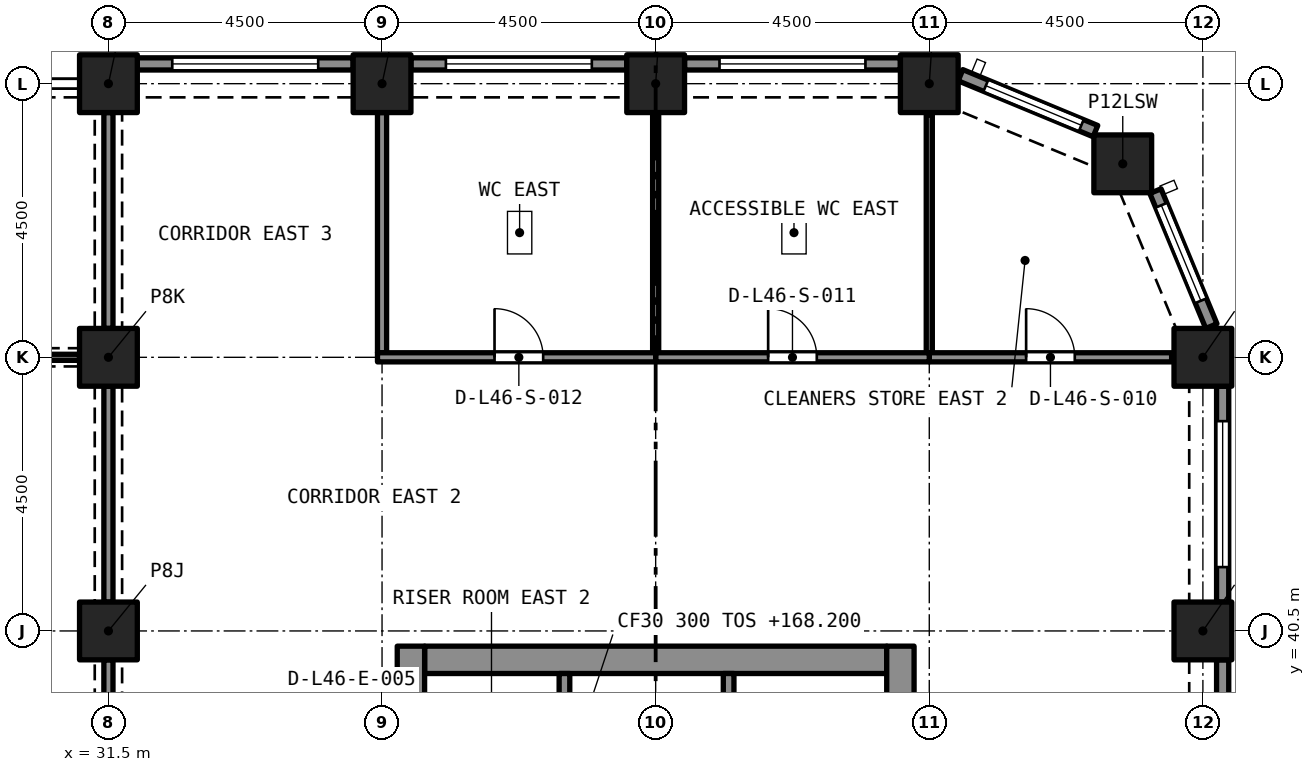
"""IFC4 building model, lengths in metres.
Left out: names, types, materials, properties, quantities, classifications, styles, units other than length and angle.
Written with IfcOpenShell. Run it as: python <this file> out.ifc"""

import sys

from ifc_helpers import new_model, si_unit, direction, frame, frame_2d, origin, origin_2d, place, context, subcontext, project, spatial, rectangle, extrude, element, fill, save


model = new_model("IFC4")
c1 = context("Model", 3, precision=1e-05, world=origin(), true_north=direction((0.0, 1.0)))
c2 = subcontext(c1, "Body", "Model", "MODEL_VIEW")
j1 = project(units=[si_unit("LENGTHUNIT", "METRE"), si_unit("PLANEANGLEUNIT", "RADIAN")], contexts=[c1])
p1 = place(None, origin())
s1 = spatial("IfcSite", under=j1, at=p1, CompositionType="ELEMENT")
p2 = place(p1, origin())
s2 = spatial("IfcBuilding", under=s1, at=p2, CompositionType="ELEMENT")
p3 = place(p2, frame((0.0, 0.0, 168.2)))
s3 = spatial("IfcBuildingStorey", under=s2, at=p3, CompositionType="ELEMENT", Elevation=168.2)
for number, where, z_axis, x_axis in (
    (1, (31.5, 40.5, 0.0), (0.0, 0.0, 1.0), (1.0, 0.0, 0.0)),
    (2, (49.5, 40.5, 0.0), (0.0, 0.0, 1.0), (1.0, 0.0, 0.0)),
    (3, (31.5, 45.0, 0.0), (0.0, 0.0, 1.0), (1.0, 0.0, 0.0)),
    (4, (49.5, 45.0, 0.0), (0.0, 0.0, 1.0), (1.0, 0.0, 0.0)),
    (5, (48.182, 48.182, 0.0), (0.0, 0.0, 1.0), (1.0, 0.0, 0.0)),
    (6, (31.5, 49.5, 0.0), (0.0, 0.0, 1.0), (1.0, 0.0, 0.0)),
    (7, (36.0, 49.5, 0.0), (0.0, 0.0, 1.0), (1.0, 0.0, 0.0)),
    (8, (40.5, 49.5, 0.0), (0.0, 0.0, 1.0), (1.0, 0.0, 0.0)),
    (9, (45.0, 49.5, 0.0), (0.0, 0.0, 1.0), (1.0, 0.0, 0.0)),
):
    element("IfcColumn", number, at=place(p3, frame(where, z_axis=z_axis, x_axis=x_axis)), inside=s3, PredefinedType="COLUMN", context=c2, shape_type="SweptSolid", body=[
        extrude(rectangle(XDim=0.95, YDim=0.95, at=origin_2d()), origin(), (0.0, 0.0, 1.0), 4.4),
    ])
p4 = place(p3, frame((36.7, 40.025, 0.0), z_axis=(0.0, 0.0, 1.0), x_axis=(1.0, 0.0, 0.0)))
e10 = element("IfcWall", 10, at=p4, inside=s3, PredefinedType="SOLIDWALL", context=c2, shape_type="SweptSolid", body=[
    extrude(rectangle(XDim=7.6, YDim=0.45, at=frame_2d((3.8, 0.0))), origin(), (0.0, 0.0, 1.0), 4.4),
])
p5 = place(p3, frame((36.475, 27.25, 0.0), z_axis=(0.0, 0.0, 1.0), x_axis=(0.0, 1.0, 0.0)))
e11 = element("IfcWall", 11, at=p5, inside=s3, PredefinedType="SOLIDWALL", context=c2, shape_type="SweptSolid", body=[
    extrude(rectangle(XDim=13.0, YDim=0.45, at=frame_2d((6.5, 0.0))), origin(), (0.0, 0.0, 1.0), 4.4),
])
p6 = place(p5, frame((8.7, 0.0, 0.0)))
e12 = element("IfcOpeningElement", 12, at=p6, cuts=e11, PredefinedType="OPENING", context=c2, shape_type="SweptSolid", body=[
    extrude(rectangle(XDim=1.2, YDim=2.1, at=frame_2d((0.6, 1.05))), frame((0.0, 0.235, 0.0), z_axis=(0.0, -1.0, 0.0), x_axis=(1.0, 0.0, 0.0)), (0.0, 0.0, 1.0), 0.47),
])
p7 = place(p3, frame((44.525, 27.25, 0.0), z_axis=(0.0, 0.0, 1.0), x_axis=(0.0, 1.0, 0.0)))
e13 = element("IfcWall", 13, at=p7, inside=s3, PredefinedType="SOLIDWALL", context=c2, shape_type="SweptSolid", body=[
    extrude(rectangle(XDim=13.0, YDim=0.45, at=frame_2d((6.5, 0.0))), origin(), (0.0, 0.0, 1.0), 4.4),
])
p8 = place(p7, frame((8.7, 0.0, 0.0)))
e14 = element("IfcOpeningElement", 14, at=p8, cuts=e13, PredefinedType="OPENING", context=c2, shape_type="SweptSolid", body=[
    extrude(rectangle(XDim=1.2, YDim=2.1, at=frame_2d((0.6, 1.05))), frame((0.0, 0.235, 0.0), z_axis=(0.0, -1.0, 0.0), x_axis=(1.0, 0.0, 0.0)), (0.0, 0.0, 1.0), 0.47),
])
p9 = place(p3, frame((49.825, 40.025, 0.0), z_axis=(0.0, 0.0, 1.0), x_axis=(0.0, -1.0, 0.0)))
e15 = element("IfcWall", 15, at=p9, inside=s3, PredefinedType="SOLIDWALL", context=c2, shape_type="SweptSolid", body=[
    extrude(rectangle(XDim=3.55, YDim=0.2, at=frame_2d((1.775, 0.0))), origin(), (0.0, 0.0, 1.0), 4.4),
])
p10 = place(p9, frame((0.575, 0.0, 0.45)))
e16 = element("IfcOpeningElement", 16, at=p10, cuts=e15, PredefinedType="OPENING", context=c2, shape_type="SweptSolid", body=[
    extrude(rectangle(XDim=2.4, YDim=2.55, at=frame_2d((1.2, 1.275))), frame((0.0, 0.11, 0.0), z_axis=(0.0, -1.0, 0.0), x_axis=(1.0, 0.0, 0.0)), (0.0, 0.0, 1.0), 0.22),
])
p11 = place(p3, frame((49.825, 44.525, 0.0), z_axis=(0.0, 0.0, 1.0), x_axis=(0.0, -1.0, 0.0)))
e17 = element("IfcWall", 17, at=p11, inside=s3, PredefinedType="SOLIDWALL", context=c2, shape_type="SweptSolid", body=[
    extrude(rectangle(XDim=3.55, YDim=0.2, at=frame_2d((1.775, 0.0))), origin(), (0.0, 0.0, 1.0), 4.4),
])
p12 = place(p11, frame((0.575, 0.0, 0.45)))
e18 = element("IfcOpeningElement", 18, at=p12, cuts=e17, PredefinedType="OPENING", context=c2, shape_type="SweptSolid", body=[
    extrude(rectangle(XDim=2.4, YDim=2.55, at=frame_2d((1.2, 1.275))), frame((0.0, 0.11, 0.0), z_axis=(0.0, -1.0, 0.0), x_axis=(1.0, 0.0, 0.0)), (0.0, 0.0, 1.0), 0.22),
])
p13 = place(p3, frame((48.72, 47.733, 0.0), z_axis=(0.0, 0.0, 1.0), x_axis=(0.382680855588, -0.923880599843, 0.0)))
e19 = element("IfcWall", 19, at=p13, inside=s3, PredefinedType="SOLIDWALL", context=c2, shape_type="SweptSolid", body=[
    extrude(rectangle(XDim=2.403, YDim=0.2, at=frame_2d((1.201, 0.0))), origin(), (0.0, 0.0, 1.0), 4.4),
])
p14 = place(p13, frame((0.251, 0.0, 0.45)))
e20 = element("IfcOpeningElement", 20, at=p14, cuts=e19, PredefinedType="OPENING", context=c2, shape_type="SweptSolid", body=[
    extrude(rectangle(XDim=1.7, YDim=2.55, at=frame_2d((0.85, 1.275))), frame((0.0, 0.11, 0.0), z_axis=(0.0, -1.0, 0.0), x_axis=(1.0, 0.0, 0.0)), (0.0, 0.0, 1.0), 0.22),
])
p15 = place(p3, frame((45.513, 49.639, 0.0), z_axis=(0.0, 0.0, 1.0), x_axis=(0.923880599843, -0.382680855588, 0.0)))
e21 = element("IfcWall", 21, at=p15, inside=s3, PredefinedType="SOLIDWALL", context=c2, shape_type="SweptSolid", body=[
    extrude(rectangle(XDim=2.403, YDim=0.2, at=frame_2d((1.201, 0.0))), origin(), (0.0, 0.0, 1.0), 4.4),
])
p16 = place(p15, frame((0.451, 0.0, 0.45)))
e22 = element("IfcOpeningElement", 22, at=p16, cuts=e21, PredefinedType="OPENING", context=c2, shape_type="SweptSolid", body=[
    extrude(rectangle(XDim=1.7, YDim=2.55, at=frame_2d((0.85, 1.275))), frame((0.0, 0.11, 0.0), z_axis=(0.0, -1.0, 0.0), x_axis=(1.0, 0.0, 0.0)), (0.0, 0.0, 1.0), 0.22),
])
p17 = place(p3, frame((40.975, 49.825, 0.0), z_axis=(0.0, 0.0, 1.0), x_axis=(1.0, 0.0, 0.0)))
e23 = element("IfcWall", 23, at=p17, inside=s3, PredefinedType="SOLIDWALL", context=c2, shape_type="SweptSolid", body=[
    extrude(rectangle(XDim=3.55, YDim=0.2, at=frame_2d((1.775, 0.0))), origin(), (0.0, 0.0, 1.0), 4.4),
])
p18 = place(p17, frame((0.575, 0.0, 0.45)))
e24 = element("IfcOpeningElement", 24, at=p18, cuts=e23, PredefinedType="OPENING", context=c2, shape_type="SweptSolid", body=[
    extrude(rectangle(XDim=2.4, YDim=2.55, at=frame_2d((1.2, 1.275))), frame((0.0, 0.11, 0.0), z_axis=(0.0, -1.0, 0.0), x_axis=(1.0, 0.0, 0.0)), (0.0, 0.0, 1.0), 0.22),
])
p19 = place(p3, frame((36.475, 49.825, 0.0), z_axis=(0.0, 0.0, 1.0), x_axis=(1.0, 0.0, 0.0)))
e25 = element("IfcWall", 25, at=p19, inside=s3, PredefinedType="SOLIDWALL", context=c2, shape_type="SweptSolid", body=[
    extrude(rectangle(XDim=3.55, YDim=0.2, at=frame_2d((1.775, 0.0))), origin(), (0.0, 0.0, 1.0), 4.4),
])
p20 = place(p19, frame((0.575, 0.0, 0.45)))
e26 = element("IfcOpeningElement", 26, at=p20, cuts=e25, PredefinedType="OPENING", context=c2, shape_type="SweptSolid", body=[
    extrude(rectangle(XDim=2.4, YDim=2.55, at=frame_2d((1.2, 1.275))), frame((0.0, 0.11, 0.0), z_axis=(0.0, -1.0, 0.0), x_axis=(1.0, 0.0, 0.0)), (0.0, 0.0, 1.0), 0.22),
])
p21 = place(p3, frame((31.975, 49.825, 0.0), z_axis=(0.0, 0.0, 1.0), x_axis=(1.0, 0.0, 0.0)))
e27 = element("IfcWall", 27, at=p21, inside=s3, PredefinedType="SOLIDWALL", context=c2, shape_type="SweptSolid", body=[
    extrude(rectangle(XDim=3.55, YDim=0.2, at=frame_2d((1.775, 0.0))), origin(), (0.0, 0.0, 1.0), 4.4),
])
p22 = place(p21, frame((0.575, 0.0, 0.45)))
e28 = element("IfcOpeningElement", 28, at=p22, cuts=e27, PredefinedType="OPENING", context=c2, shape_type="SweptSolid", body=[
    extrude(rectangle(XDim=2.4, YDim=2.55, at=frame_2d((1.2, 1.275))), frame((0.0, 0.11, 0.0), z_axis=(0.0, -1.0, 0.0), x_axis=(1.0, 0.0, 0.0)), (0.0, 0.0, 1.0), 0.22),
])
for number, where, z_axis, x_axis in (
    (29, (41.7, 37.5, 0.0), (0.0, 0.0, 1.0), (0.0, 1.0, 0.0)),
    (30, (39.0, 37.5, 0.0), (0.0, 0.0, 1.0), (0.0, 1.0, 0.0)),
):
    element("IfcWall", number, at=place(p3, frame(where, z_axis=z_axis, x_axis=x_axis)), inside=s3, PredefinedType="SOLIDWALL", context=c2, shape_type="SweptSolid", body=[
        extrude(rectangle(XDim=2.3, YDim=0.175, at=frame_2d((1.15, 0.0))), origin(), (0.0, 0.0, 1.0), 4.1),
    ])
p23 = place(p3, frame((18.475, 45.0, 0.0), z_axis=(0.0, 0.0, 1.0), x_axis=(1.0, 0.0, 0.0)))
e31 = element("IfcWall", 31, at=p23, inside=s3, PredefinedType="PARTITIONING", context=c2, shape_type="SweptSolid", body=[
    extrude(rectangle(XDim=12.55, YDim=0.1, at=frame_2d((6.275, 0.0))), origin(), (0.0, 0.0, 1.0), 3.95),
])
p24 = place(p3, frame((31.5, 36.475, 0.0), z_axis=(0.0, 0.0, 1.0), x_axis=(0.0, 1.0, 0.0)))
e32 = element("IfcWall", 32, at=p24, inside=s3, PredefinedType="PARTITIONING", context=c2, shape_type="SweptSolid", body=[
    extrude(rectangle(XDim=3.55, YDim=0.15, at=frame_2d((1.775, 0.0))), origin(), (0.0, 0.0, 1.0), 3.58),
])
p25 = place(p24, frame((1.175, 0.0, 0.0)))
e33 = element("IfcOpeningElement", 33, at=p25, cuts=e32, PredefinedType="OPENING", context=c2, shape_type="SweptSolid", body=[
    extrude(rectangle(XDim=1.2, YDim=2.1, at=frame_2d((0.6, 1.05))), frame((0.0, 0.085, 0.0), z_axis=(0.0, -1.0, 0.0), x_axis=(1.0, 0.0, 0.0)), (0.0, 0.0, 1.0), 0.17),
])
for number, where, z_axis, x_axis in (
    (34, (31.5, 40.975, 0.0), (0.0, 0.0, 1.0), (0.0, 1.0, 0.0)),
    (35, (31.5, 45.475, 0.0), (0.0, 0.0, 1.0), (0.0, 1.0, 0.0)),
):
    element("IfcWall", number, at=place(p3, frame(where, z_axis=z_axis, x_axis=x_axis)), inside=s3, PredefinedType="PARTITIONING", context=c2, shape_type="SweptSolid", body=[
        extrude(rectangle(XDim=3.55, YDim=0.15, at=frame_2d((1.775, 0.0))), origin(), (0.0, 0.0, 1.0), 3.58),
    ])
p26 = place(p3, frame((45.0, 45.075, 0.0), z_axis=(0.0, 0.0, 1.0), x_axis=(0.0, 1.0, 0.0)))
e36 = element("IfcWall", 36, at=p26, inside=s3, PredefinedType="PARTITIONING", context=c2, shape_type="SweptSolid", body=[
    extrude(rectangle(XDim=3.911, YDim=0.1, at=frame_2d((1.956, 0.0))), origin(), (0.0, 0.0, 1.0), 4.1),
])
p27 = place(p3, frame((45.0, 45.0, 0.0), z_axis=(0.0, 0.0, 1.0), x_axis=(1.0, 0.0, 0.0)))
e37 = element("IfcWall", 37, at=p27, inside=s3, PredefinedType="PARTITIONING", context=c2, shape_type="SweptSolid", body=[
    extrude(rectangle(XDim=3.986, YDim=0.15, at=frame_2d((1.993, 0.0))), origin(), (0.0, 0.0, 1.0), 4.1),
])
p28 = place(p27, frame((1.593, 0.0, 0.0)))
e38 = element("IfcOpeningElement", 38, at=p28, cuts=e37, PredefinedType="OPENING", context=c2, shape_type="SweptSolid", body=[
    extrude(rectangle(XDim=0.8, YDim=2.1, at=frame_2d((0.4, 1.05))), frame((0.0, 0.085, 0.0), z_axis=(0.0, -1.0, 0.0), x_axis=(1.0, 0.0, 0.0)), (0.0, 0.0, 1.0), 0.17),
])
p29 = place(p3, frame((40.5, 45.075, 0.0), z_axis=(0.0, 0.0, 1.0), x_axis=(0.0, 1.0, 0.0)))
e39 = element("IfcWall", 39, at=p29, inside=s3, PredefinedType="PARTITIONING", context=c2, shape_type="SweptSolid", body=[
    extrude(rectangle(XDim=3.95, YDim=0.1, at=frame_2d((1.975, 0.0))), origin(), (0.0, 0.0, 1.0), 4.1),
])
p30 = place(p3, frame((40.5, 45.0, 0.0), z_axis=(0.0, 0.0, 1.0), x_axis=(1.0, 0.0, 0.0)))
e40 = element("IfcWall", 40, at=p30, inside=s3, PredefinedType="PARTITIONING", context=c2, shape_type="SweptSolid", body=[
    extrude(rectangle(XDim=4.5, YDim=0.15, at=frame_2d((2.25, 0.0))), origin(), (0.0, 0.0, 1.0), 4.1),
])
p31 = place(p30, frame((1.85, 0.0, 0.0)))
e41 = element("IfcOpeningElement", 41, at=p31, cuts=e40, PredefinedType="OPENING", context=c2, shape_type="SweptSolid", body=[
    extrude(rectangle(XDim=0.8, YDim=2.1, at=frame_2d((0.4, 1.05))), frame((0.0, 0.085, 0.0), z_axis=(0.0, -1.0, 0.0), x_axis=(1.0, 0.0, 0.0)), (0.0, 0.0, 1.0), 0.17),
])
p32 = place(p3, frame((36.0, 45.075, 0.0), z_axis=(0.0, 0.0, 1.0), x_axis=(0.0, 1.0, 0.0)))
e42 = element("IfcWall", 42, at=p32, inside=s3, PredefinedType="PARTITIONING", context=c2, shape_type="SweptSolid", body=[
    extrude(rectangle(XDim=3.95, YDim=0.15, at=frame_2d((1.975, 0.0))), origin(), (0.0, 0.0, 1.0), 4.1),
])
p33 = place(p3, frame((35.925, 45.0, 0.0), z_axis=(0.0, 0.0, 1.0), x_axis=(1.0, 0.0, 0.0)))
e43 = element("IfcWall", 43, at=p33, inside=s3, PredefinedType="PARTITIONING", context=c2, shape_type="SweptSolid", body=[
    extrude(rectangle(XDim=4.575, YDim=0.15, at=frame_2d((2.288, 0.0))), origin(), (0.0, 0.0, 1.0), 4.1),
])
p34 = place(p33, frame((1.925, 0.0, 0.0)))
e44 = element("IfcOpeningElement", 44, at=p34, cuts=e43, PredefinedType="OPENING", context=c2, shape_type="SweptSolid", body=[
    extrude(rectangle(XDim=0.8, YDim=2.1, at=frame_2d((0.4, 1.05))), frame((0.0, 0.085, 0.0), z_axis=(0.0, -1.0, 0.0), x_axis=(1.0, 0.0, 0.0)), (0.0, 0.0, 1.0), 0.17),
])
p35 = place(p12, origin())
e45 = element("IfcWindow", 45, at=p35, inside=s3, PartitioningType="SINGLE_PANEL", PredefinedType="WINDOW", context=c2, shape_type="SweptSolid", body=[
    extrude(rectangle(XDim=2.4, YDim=2.55, at=frame_2d((1.2, 1.275))), frame((0.0, 0.03, 0.0), z_axis=(0.0, -1.0, 0.0), x_axis=(1.0, 0.0, 0.0)), (0.0, 0.0, 1.0), 0.06),
])
fill(e18, e45)
p36 = place(p14, origin())
e46 = element("IfcWindow", 46, at=p36, inside=s3, PartitioningType="SINGLE_PANEL", PredefinedType="WINDOW", context=c2, shape_type="SweptSolid", body=[
    extrude(rectangle(XDim=1.7, YDim=2.55, at=frame_2d((0.85, 1.275))), frame((0.0, 0.03, 0.0), z_axis=(0.0, -1.0, 0.0), x_axis=(1.0, 0.0, 0.0)), (0.0, 0.0, 1.0), 0.06),
])
fill(e20, e46)
p37 = place(p16, origin())
e47 = element("IfcWindow", 47, at=p37, inside=s3, PartitioningType="SINGLE_PANEL", PredefinedType="WINDOW", context=c2, shape_type="SweptSolid", body=[
    extrude(rectangle(XDim=1.7, YDim=2.55, at=frame_2d((0.85, 1.275))), frame((0.0, 0.03, 0.0), z_axis=(0.0, -1.0, 0.0), x_axis=(1.0, 0.0, 0.0)), (0.0, 0.0, 1.0), 0.06),
])
fill(e22, e47)
p38 = place(p18, origin())
e48 = element("IfcWindow", 48, at=p38, inside=s3, PartitioningType="SINGLE_PANEL", PredefinedType="WINDOW", context=c2, shape_type="SweptSolid", body=[
    extrude(rectangle(XDim=2.4, YDim=2.55, at=frame_2d((1.2, 1.275))), frame((0.0, 0.03, 0.0), z_axis=(0.0, -1.0, 0.0), x_axis=(1.0, 0.0, 0.0)), (0.0, 0.0, 1.0), 0.06),
])
fill(e24, e48)
p39 = place(p20, origin())
e49 = element("IfcWindow", 49, at=p39, inside=s3, PartitioningType="SINGLE_PANEL", PredefinedType="WINDOW", context=c2, shape_type="SweptSolid", body=[
    extrude(rectangle(XDim=2.4, YDim=2.55, at=frame_2d((1.2, 1.275))), frame((0.0, 0.03, 0.0), z_axis=(0.0, -1.0, 0.0), x_axis=(1.0, 0.0, 0.0)), (0.0, 0.0, 1.0), 0.06),
])
fill(e26, e49)
p40 = place(p22, origin())
e50 = element("IfcWindow", 50, at=p40, inside=s3, PartitioningType="SINGLE_PANEL", PredefinedType="WINDOW", context=c2, shape_type="SweptSolid", body=[
    extrude(rectangle(XDim=2.4, YDim=2.55, at=frame_2d((1.2, 1.275))), frame((0.0, 0.03, 0.0), z_axis=(0.0, -1.0, 0.0), x_axis=(1.0, 0.0, 0.0)), (0.0, 0.0, 1.0), 0.06),
])
fill(e28, e50)
p41 = place(p28, origin())
e51 = element("IfcDoor", 51, at=p41, inside=s3, OperationType="SINGLE_SWING_RIGHT", PredefinedType="DOOR", context=c2, shape_type="SweptSolid", body=[
    extrude(rectangle(XDim=0.8, YDim=2.1, at=frame_2d((0.4, 1.05))), frame((0.0, 0.025, 0.0), z_axis=(0.0, -1.0, 0.0), x_axis=(1.0, 0.0, 0.0)), (0.0, 0.0, 1.0), 0.05),
])
fill(e38, e51)
p42 = place(p31, origin())
e52 = element("IfcDoor", 52, at=p42, inside=s3, OperationType="SINGLE_SWING_RIGHT", PredefinedType="DOOR", context=c2, shape_type="SweptSolid", body=[
    extrude(rectangle(XDim=0.8, YDim=2.1, at=frame_2d((0.4, 1.05))), frame((0.0, 0.025, 0.0), z_axis=(0.0, -1.0, 0.0), x_axis=(1.0, 0.0, 0.0)), (0.0, 0.0, 1.0), 0.05),
])
fill(e41, e52)
p43 = place(p34, origin())
e53 = element("IfcDoor", 53, at=p43, inside=s3, OperationType="SINGLE_SWING_RIGHT", PredefinedType="DOOR", context=c2, shape_type="SweptSolid", body=[
    extrude(rectangle(XDim=0.8, YDim=2.1, at=frame_2d((0.4, 1.05))), frame((0.0, 0.025, 0.0), z_axis=(0.0, -1.0, 0.0), x_axis=(1.0, 0.0, 0.0)), (0.0, 0.0, 1.0), 0.05),
])
fill(e44, e53)
save(model, sys.argv[1])
